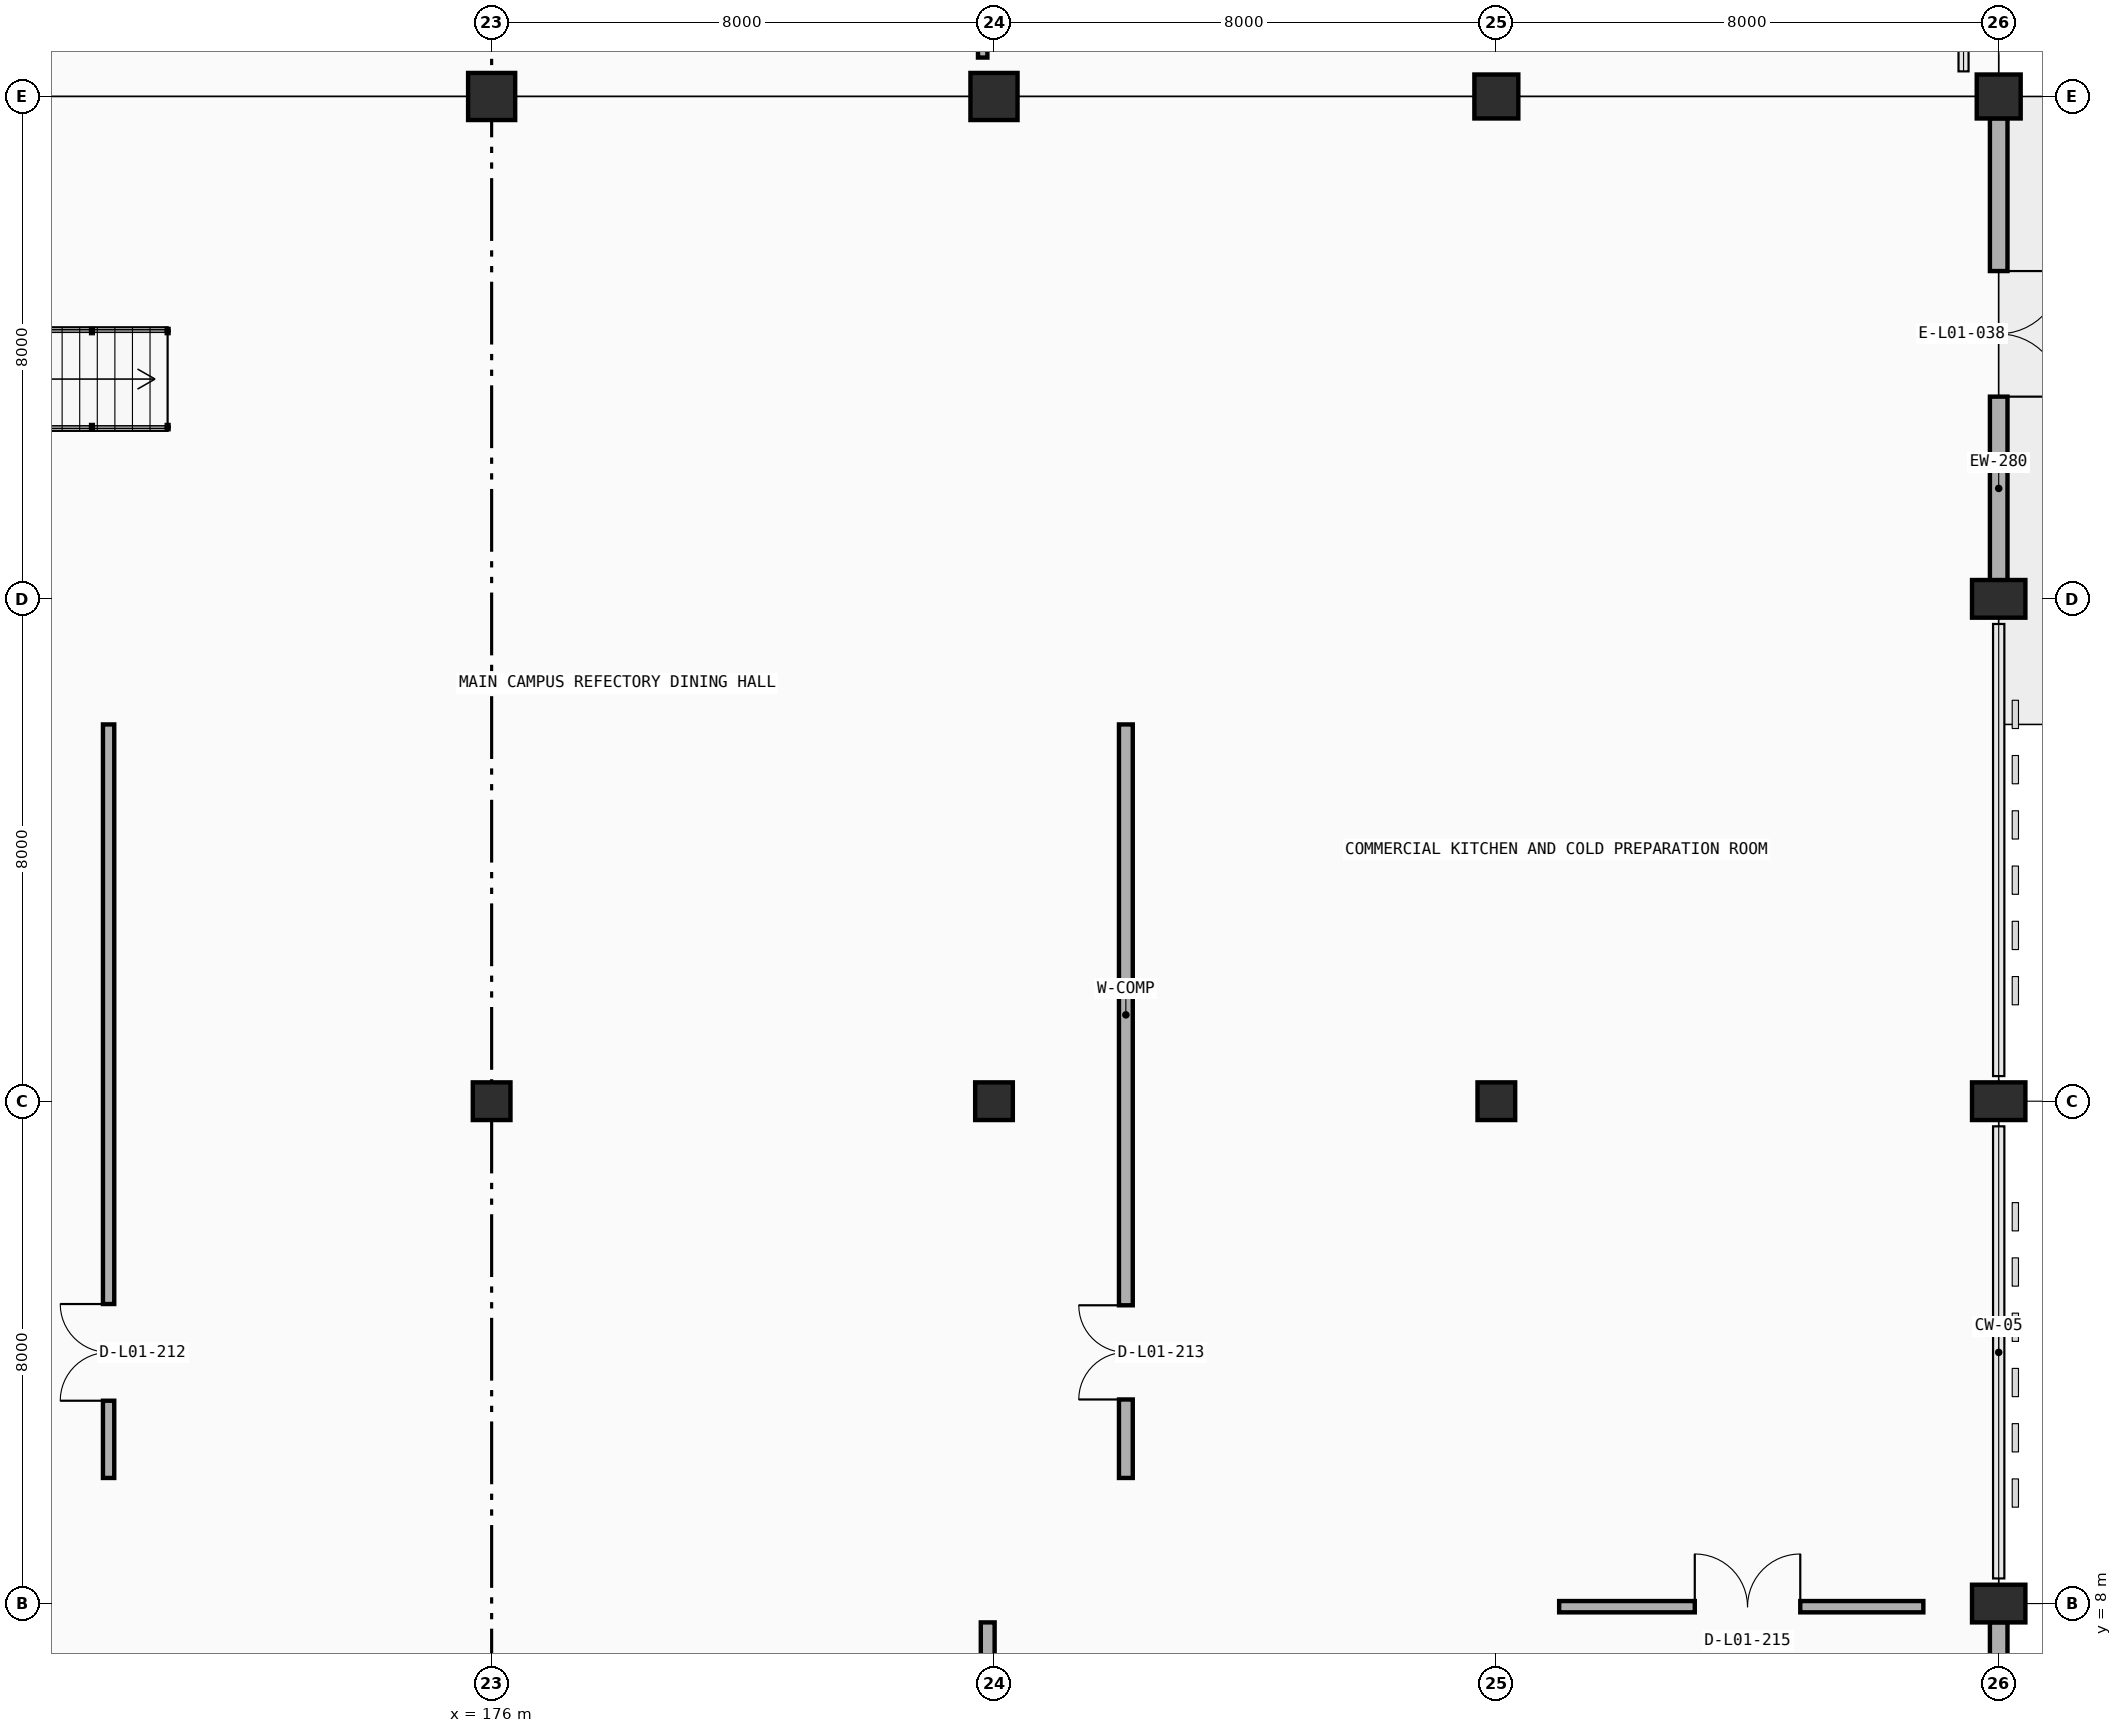
"""IFC4 building model, lengths in metres.
Left out: names, types, materials, properties, quantities, classifications, styles, units other than length and angle.
Written with IfcOpenShell. Run it as: python <this file> out.ifc"""

import sys

from ifc_helpers import new_model, si_unit, direction, frame, frame_2d, origin, origin_2d, place, context, subcontext, project, spatial, rectangle, extrude, element, fill, save


model = new_model("IFC4")
c1 = context("Model", 3, precision=1e-05, world=origin(), true_north=direction((0.0, 1.0)))
c2 = subcontext(c1, "Body", "Model", "MODEL_VIEW")
j1 = project(units=[si_unit("LENGTHUNIT", "METRE"), si_unit("PLANEANGLEUNIT", "RADIAN")], contexts=[c1])
p1 = place(None, origin())
s1 = spatial("IfcSite", under=j1, at=p1, CompositionType="ELEMENT")
p2 = place(p1, origin())
s2 = spatial("IfcBuilding", under=s1, at=p2, CompositionType="ELEMENT")
p3 = place(p2, origin())
s3 = spatial("IfcBuildingStorey", under=s2, at=p3, CompositionType="ELEMENT", Elevation=0.0)
p4 = place(p3, frame((200.0, 8.0, 0.0), z_axis=(0.0, 0.0, 1.0), x_axis=(0.0, 1.0, 0.0)))
e1 = element("IfcColumn", 1, at=p4, inside=s3, PredefinedType="COLUMN", context=c2, shape_type="SweptSolid", body=[
    extrude(rectangle(XDim=0.6, YDim=0.85, at=origin_2d()), origin(), (0.0, 0.0, 1.0), 4.8),
])
for number, where, z_axis, x_axis in (
    (2, (176.0, 16.0, 0.0), (0.0, 0.0, 1.0), (1.0, 0.0, 0.0)),
    (3, (184.0, 16.0, 0.0), (0.0, 0.0, 1.0), (1.0, 0.0, 0.0)),
    (4, (192.0, 16.0, 0.0), (0.0, 0.0, 1.0), (1.0, 0.0, 0.0)),
):
    element("IfcColumn", number, at=place(p3, frame(where, z_axis=z_axis, x_axis=x_axis)), inside=s3, PredefinedType="COLUMN", context=c2, shape_type="SweptSolid", body=[
        extrude(rectangle(XDim=0.6, YDim=0.6, at=origin_2d()), origin(), (0.0, 0.0, 1.0), 4.8),
    ])
for number, where, z_axis, x_axis in (
    (5, (200.0, 16.0, 0.0), (0.0, 0.0, 1.0), (0.0, 1.0, 0.0)),
    (6, (200.0, 24.0, 0.0), (0.0, 0.0, 1.0), (0.0, 1.0, 0.0)),
):
    element("IfcColumn", number, at=place(p3, frame(where, z_axis=z_axis, x_axis=x_axis)), inside=s3, PredefinedType="COLUMN", context=c2, shape_type="SweptSolid", body=[
        extrude(rectangle(XDim=0.6, YDim=0.85, at=origin_2d()), origin(), (0.0, 0.0, 1.0), 4.8),
    ])
for number, where, z_axis, x_axis in (
    (7, (176.0, 32.0, 0.0), (0.0, 0.0, 1.0), (1.0, 0.0, 0.0)),
    (8, (184.0, 32.0, 0.0), (0.0, 0.0, 1.0), (1.0, 0.0, 0.0)),
):
    element("IfcColumn", number, at=place(p3, frame(where, z_axis=z_axis, x_axis=x_axis)), inside=s3, PredefinedType="COLUMN", context=c2, shape_type="SweptSolid", body=[
        extrude(rectangle(XDim=0.75, YDim=0.75, at=origin_2d()), origin(), (0.0, 0.0, 1.0), 4.8),
    ])
for number, where, z_axis, x_axis in (
    (9, (192.0, 32.0, 0.0), (0.0, 0.0, 1.0), (1.0, 0.0, 0.0)),
    (10, (200.0, 32.0, 0.0), (0.0, 0.0, 1.0), (1.0, 0.0, 0.0)),
):
    element("IfcColumn", number, at=place(p3, frame(where, z_axis=z_axis, x_axis=x_axis)), inside=s3, PredefinedType="COLUMN", context=c2, shape_type="SweptSolid", body=[
        extrude(rectangle(XDim=0.7, YDim=0.7, at=origin_2d()), origin(), (0.0, 0.0, 1.0), 4.8),
    ])
p5 = place(p3, frame((199.76, 32.22, 0.0), z_axis=(0.0, 0.0, 1.0), x_axis=(-1.0, 0.0, 0.0)))
e11 = element("IfcWall", 11, at=p5, inside=s3, PredefinedType="PARAPET", context=c2, shape_type="SweptSolid", body=[
    extrude(rectangle(XDim=0.32, YDim=0.2, at=frame_2d((0.16, 0.0))), origin(), (0.0, 0.0, 1.0), 3.95),
])
p6 = place(p3, frame((200.0, 7.703, 0.0), z_axis=(0.0, 0.0, 1.0), x_axis=(0.0, -1.0, 0.0)))
e12 = element("IfcWall", 12, at=p6, inside=s3, PredefinedType="STANDARD", context=c2, shape_type="SweptSolid", body=[
    extrude(rectangle(XDim=7.406, YDim=0.28, at=frame_2d((3.703, 0.0))), origin(), (0.0, 0.0, 1.0), 3.59),
])
p7 = place(p6, frame((2.083, 0.0, 0.95)))
e13 = element("IfcOpeningElement", 13, at=p7, cuts=e12, PredefinedType="OPENING", context=c2, shape_type="SweptSolid", body=[
    extrude(rectangle(XDim=3.3, YDim=1.75, at=frame_2d((1.65, 0.875))), frame((0.0, 0.15, 0.0), z_axis=(0.0, -1.0, 0.0), x_axis=(1.0, 0.0, 0.0)), (0.0, 0.0, 1.0), 0.3),
])
p8 = place(p3, frame((200.0, 31.653, 0.0), z_axis=(0.0, 0.0, 1.0), x_axis=(0.0, -1.0, 0.0)))
e14 = element("IfcWall", 14, at=p8, inside=s3, PredefinedType="STANDARD", context=c2, shape_type="SweptSolid", body=[
    extrude(rectangle(XDim=7.356, YDim=0.28, at=frame_2d((3.678, 0.0))), origin(), (0.0, 0.0, 1.0), 3.59),
])
p9 = place(p8, frame((2.433, 0.0, 0.0)))
e15 = element("IfcOpeningElement", 15, at=p9, cuts=e14, PredefinedType="OPENING", context=c2, shape_type="SweptSolid", body=[
    extrude(rectangle(XDim=2.0, YDim=2.4, at=frame_2d((1.0, 1.2))), frame((0.0, 0.15, 0.0), z_axis=(0.0, -1.0, 0.0), x_axis=(1.0, 0.0, 0.0)), (0.0, 0.0, 1.0), 0.3),
])
p10 = place(p3, frame((183.82, 32.62, 0.0), z_axis=(0.0, 0.0, 1.0), x_axis=(0.0, 1.0, 0.0)))
e16 = element("IfcWall", 16, at=p10, inside=s3, PredefinedType="PARTITIONING", context=c2, shape_type="SweptSolid", body=[
    extrude(rectangle(XDim=6.81, YDim=0.15, at=frame_2d((3.405, 0.0))), origin(), (0.0, 0.0, 1.0), 3.76),
])
p11 = place(p3, frame((169.9, 10.0, 0.0), z_axis=(0.0, 0.0, 1.0), x_axis=(0.0, 1.0, 0.0)))
e17 = element("IfcWall", 17, at=p11, inside=s3, PredefinedType="PARTITIONING", context=c2, shape_type="SweptSolid", body=[
    extrude(rectangle(XDim=12.0, YDim=0.18, at=frame_2d((6.0, 0.0))), origin(), (0.0, 0.0, 1.0), 3.9),
])
p12 = place(p11, frame((1.23, 0.0, 0.0)))
e18 = element("IfcOpeningElement", 18, at=p12, cuts=e17, PredefinedType="OPENING", context=c2, shape_type="SweptSolid", body=[
    extrude(rectangle(XDim=1.54, YDim=2.2, at=frame_2d((0.77, 1.1))), frame((0.0, 0.1, 0.0), z_axis=(0.0, -1.0, 0.0), x_axis=(1.0, 0.0, 0.0)), (0.0, 0.0, 1.0), 0.2),
])
p13 = place(p3, frame((186.1, 10.0, 0.0), z_axis=(0.0, 0.0, 1.0), x_axis=(0.0, 1.0, 0.0)))
e19 = element("IfcWall", 19, at=p13, inside=s3, PredefinedType="PARTITIONING", context=c2, shape_type="SweptSolid", body=[
    extrude(rectangle(XDim=12.0, YDim=0.22, at=frame_2d((6.0, 0.0))), origin(), (0.0, 0.0, 1.0), 3.9),
])
p14 = place(p13, frame((1.25, 0.0, 0.0)))
e20 = element("IfcOpeningElement", 20, at=p14, cuts=e19, PredefinedType="OPENING", context=c2, shape_type="SweptSolid", body=[
    extrude(rectangle(XDim=1.5, YDim=2.2, at=frame_2d((0.75, 1.1))), frame((0.0, 0.12, 0.0), z_axis=(0.0, -1.0, 0.0), x_axis=(1.0, 0.0, 0.0)), (0.0, 0.0, 1.0), 0.24),
])
p15 = place(p3, frame((193.0, 7.95, 0.0), z_axis=(0.0, 0.0, 1.0), x_axis=(1.0, 0.0, 0.0)))
e21 = element("IfcWall", 21, at=p15, inside=s3, PredefinedType="PARTITIONING", context=c2, shape_type="SweptSolid", body=[
    extrude(rectangle(XDim=5.8, YDim=0.18, at=frame_2d((2.9, 0.0))), origin(), (0.0, 0.0, 1.0), 3.9),
])
p16 = place(p15, frame((2.16, 0.0, 0.0)))
e22 = element("IfcOpeningElement", 22, at=p16, cuts=e21, PredefinedType="OPENING", context=c2, shape_type="SweptSolid", body=[
    extrude(rectangle(XDim=1.68, YDim=2.25, at=frame_2d((0.84, 1.125))), frame((0.0, 0.1, 0.0), z_axis=(0.0, -1.0, 0.0), x_axis=(1.0, 0.0, 0.0)), (0.0, 0.0, 1.0), 0.2),
])
p17 = place(p3, frame((183.9, 5.0, 0.0), z_axis=(0.0, 0.0, 1.0), x_axis=(0.0, 1.0, 0.0)))
e23 = element("IfcWall", 23, at=p17, inside=s3, PredefinedType="PARTITIONING", context=c2, shape_type="SweptSolid", body=[
    extrude(rectangle(XDim=2.7, YDim=0.22, at=frame_2d((1.35, 0.0))), origin(), (0.0, 0.0, 1.0), 3.812),
])
p18 = place(p17, frame((0.6, 0.0, 0.0)))
e24 = element("IfcOpeningElement", 24, at=p18, cuts=e23, PredefinedType="OPENING", context=c2, shape_type="SweptSolid", body=[
    extrude(rectangle(XDim=1.5, YDim=2.2, at=frame_2d((0.75, 1.1))), frame((0.0, 0.12, 0.0), z_axis=(0.0, -1.0, 0.0), x_axis=(1.0, 0.0, 0.0)), (0.0, 0.0, 1.0), 0.24),
])
p19 = place(p9, origin())
e25 = element("IfcDoor", 25, at=p19, inside=s3, OperationType="DOUBLE_DOOR_SINGLE_SWING", PredefinedType="DOOR", context=c2, shape_type="SweptSolid", body=[
    extrude(rectangle(XDim=2.0, YDim=2.4, at=frame_2d((1.0, 1.2))), frame((0.0, 0.025, 0.0), z_axis=(0.0, -1.0, 0.0), x_axis=(1.0, 0.0, 0.0)), (0.0, 0.0, 1.0), 0.05),
])
fill(e15, e25)
p20 = place(p12, origin())
e26 = element("IfcDoor", 26, at=p20, inside=s3, OperationType="DOUBLE_DOOR_SINGLE_SWING", PredefinedType="DOOR", context=c2, shape_type="SweptSolid", body=[
    extrude(rectangle(XDim=1.54, YDim=2.2, at=frame_2d((0.77, 1.1))), frame((0.0, 0.025, 0.0), z_axis=(0.0, -1.0, 0.0), x_axis=(1.0, 0.0, 0.0)), (0.0, 0.0, 1.0), 0.05),
])
fill(e18, e26)
p21 = place(p14, origin())
e27 = element("IfcDoor", 27, at=p21, inside=s3, OperationType="DOUBLE_DOOR_SINGLE_SWING", PredefinedType="DOOR", context=c2, shape_type="SweptSolid", body=[
    extrude(rectangle(XDim=1.5, YDim=2.2, at=frame_2d((0.75, 1.1))), frame((0.0, 0.025, 0.0), z_axis=(0.0, -1.0, 0.0), x_axis=(1.0, 0.0, 0.0)), (0.0, 0.0, 1.0), 0.05),
])
fill(e20, e27)
p22 = place(p16, origin())
e28 = element("IfcDoor", 28, at=p22, inside=s3, OperationType="DOUBLE_DOOR_SINGLE_SWING", PredefinedType="DOOR", context=c2, shape_type="SweptSolid", body=[
    extrude(rectangle(XDim=1.68, YDim=2.25, at=frame_2d((0.84, 1.125))), frame((0.0, 0.025, 0.0), z_axis=(0.0, -1.0, 0.0), x_axis=(1.0, 0.0, 0.0)), (0.0, 0.0, 1.0), 0.05),
])
fill(e22, e28)
save(model, sys.argv[1])
